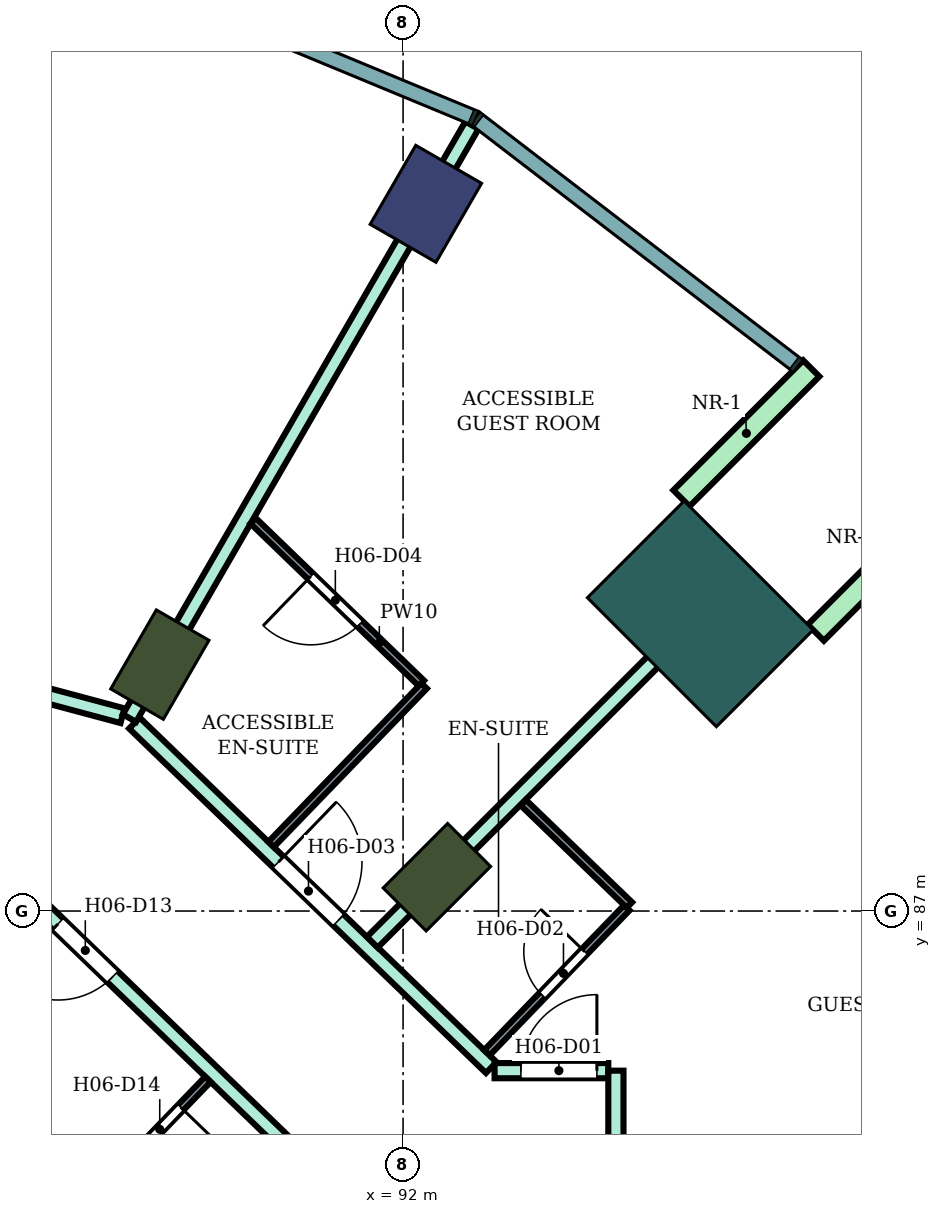
"""IFC4 building model, lengths in metres.
Left out: names, types, materials, properties, quantities, classifications, styles, units other than length and angle.
Written with IfcOpenShell. Run it as: python <this file> out.ifc"""

import sys

from ifc_helpers import new_model, si_unit, direction, frame, frame_2d, origin, origin_2d, place, context, subcontext, project, spatial, rectangle, extrude, element, fill, save


model = new_model("IFC4")
c1 = context("Model", 3, precision=1e-05, world=origin(), true_north=direction((0.0, 1.0)))
c2 = subcontext(c1, "Body", "Model", "MODEL_VIEW")
j1 = project(units=[si_unit("LENGTHUNIT", "METRE"), si_unit("PLANEANGLEUNIT", "RADIAN")], contexts=[c1])
p1 = place(None, origin())
s1 = spatial("IfcSite", under=j1, at=p1, CompositionType="ELEMENT")
p2 = place(p1, origin())
s2 = spatial("IfcBuilding", under=s1, at=p2, CompositionType="ELEMENT")
p3 = place(p2, frame((0.0, 0.0, 97.6)))
s3 = spatial("IfcBuildingStorey", under=s2, at=p3, CompositionType="ELEMENT", Elevation=97.6)
p4 = place(p3, frame((92.3, 96.304, 0.0), z_axis=(0.0, 0.0, 1.0), x_axis=(0.5, 0.866025403784, 0.0)))
e1 = element("IfcColumn", 1, at=p4, inside=s3, PredefinedType="COLUMN", context=c2, shape_type="SweptSolid", body=[
    extrude(rectangle(XDim=1.2, YDim=1.0, at=origin_2d()), origin(), (0.0, 0.0, 1.0), 3.8),
])
for number, where, z_axis, x_axis in (
    (2, (92.445, 87.445, 0.0), (0.0, 0.0, 1.0), (0.707, 0.707, 0.0)),
    (3, (88.8, 90.242, 0.0), (0.0, 0.0, 1.0), (0.5, 0.866, 0.0)),
):
    element("IfcColumn", number, at=place(p3, frame(where, z_axis=z_axis, x_axis=x_axis)), inside=s3, PredefinedType="COLUMN", context=c2, shape_type="SweptSolid", body=[
        extrude(rectangle(XDim=1.2, YDim=0.8, at=origin_2d()), origin(), (0.0, 0.0, 1.0), 3.8),
    ])
p5 = place(p3, frame((95.91, 90.91, 0.0), z_axis=(0.0, 0.0, 1.0), x_axis=(0.707106781187, 0.707106781187, 0.0)))
e4 = element("IfcColumn", 4, at=p5, inside=s3, PredefinedType="COLUMN", context=c2, shape_type="SweptSolid", body=[
    extrude(rectangle(XDim=1.8, YDim=2.4, at=origin_2d()), origin(), (0.0, 0.0, 1.0), 3.8),
])
for number, where, z_axis, x_axis in (
    (5, (97.43, 90.662, 0.0), (0.0, 0.0, 1.0), (0.707, 0.707, 0.0)),
    (6, (95.662, 92.43, 0.0), (0.0, 0.0, 1.0), (0.707, 0.707, 0.0)),
):
    element("IfcWall", number, at=place(p3, frame(where, z_axis=z_axis, x_axis=x_axis)), inside=s3, PredefinedType="NOTDEFINED", context=c2, shape_type="SweptSolid", body=[
        extrude(rectangle(XDim=2.416, YDim=0.3, at=frame_2d((1.208, 0.0))), origin(), (0.0, 0.0, 1.0), 3.8),
    ])
p6 = place(p3, frame((80.0, 91.796, 0.0), z_axis=(0.0, 0.0, 1.0), x_axis=(0.965917643923, -0.258849580177, 0.0)))
e7 = element("IfcWall", 7, at=p6, inside=s3, PredefinedType="PARTITIONING", context=c2, shape_type="SweptSolid", body=[
    extrude(rectangle(XDim=8.602, YDim=0.2, at=frame_2d((4.301, 0.0))), origin(), (0.0, 0.0, 1.0), 3.35),
])
p7 = place(p6, frame((2.091, 0.0, 0.0)))
e8 = element("IfcOpeningElement", 8, at=p7, cuts=e7, PredefinedType="OPENING", context=c2, shape_type="SweptSolid", body=[
    extrude(rectangle(XDim=1.8, YDim=2.1, at=frame_2d((0.9, 1.05))), frame((0.0, 0.11, 0.0), z_axis=(0.0, -1.0, 0.0), x_axis=(1.0, 0.0, 0.0)), (0.0, 0.0, 1.0), 0.22),
])
p8 = place(p3, frame((87.064, 87.211, 0.0), z_axis=(0.0, 0.0, 1.0), x_axis=(0.719540958932, -0.694450004262, 0.0)))
e9 = element("IfcWall", 9, at=p8, inside=s3, PredefinedType="PARTITIONING", context=c2, shape_type="SweptSolid", body=[
    extrude(rectangle(XDim=5.488, YDim=0.2, at=frame_2d((2.744, 0.0))), origin(), (0.0, 0.0, 1.0), 3.35),
])
p9 = place(p8, frame((0.55, 0.0, 0.0)))
e10 = element("IfcOpeningElement", 10, at=p9, cuts=e9, PredefinedType="OPENING", context=c2, shape_type="SweptSolid", body=[
    extrude(rectangle(XDim=1.0, YDim=2.1, at=frame_2d((0.5, 1.05))), frame((0.0, 0.11, 0.0), z_axis=(0.0, -1.0, 0.0), x_axis=(1.0, 0.0, 0.0)), (0.0, 0.0, 1.0), 0.22),
])
p10 = place(p3, frame((88.465, 89.473, 0.0), z_axis=(0.0, 0.0, 1.0), x_axis=(0.719474304909, -0.694519059908, 0.0)))
e11 = element("IfcWall", 11, at=p10, inside=s3, PredefinedType="PARTITIONING", context=c2, shape_type="SweptSolid", body=[
    extrude(rectangle(XDim=6.525, YDim=0.2, at=frame_2d((3.263, 0.0))), origin(), (0.0, 0.0, 1.0), 3.35),
])
p11 = place(p10, frame((2.633, 0.0, 0.0)))
e12 = element("IfcOpeningElement", 12, at=p11, cuts=e11, PredefinedType="OPENING", context=c2, shape_type="SweptSolid", body=[
    extrude(rectangle(XDim=1.1, YDim=2.1, at=frame_2d((0.55, 1.05))), frame((0.0, 0.11, 0.0), z_axis=(0.0, -1.0, 0.0), x_axis=(1.0, 0.0, 0.0)), (0.0, 0.0, 1.0), 0.22),
])
p12 = place(p3, frame((88.4, 89.538, 0.0), z_axis=(0.0, 0.0, 1.0), x_axis=(0.500234695877, 0.865889859648, 0.0)))
e13 = element("IfcWall", 13, at=p12, inside=s3, PredefinedType="PARTITIONING", context=c2, shape_type="SweptSolid", body=[
    extrude(rectangle(XDim=9.007, YDim=0.2, at=frame_2d((4.503, 0.0))), origin(), (0.0, 0.0, 1.0), 3.35),
])
p13 = place(p3, frame((91.595, 86.59, 0.0), z_axis=(0.0, 0.0, 1.0), x_axis=(0.707232337591, 0.706981202484, 0.0)))
e14 = element("IfcWall", 14, at=p13, inside=s3, PredefinedType="PARTITIONING", context=c2, shape_type="SweptSolid", body=[
    extrude(rectangle(XDim=6.805, YDim=0.2, at=frame_2d((3.402, 0.0))), origin(), (0.0, 0.0, 1.0), 3.35),
])
p14 = place(p3, frame((93.204, 84.9, 0.0), z_axis=(0.0, 0.0, 1.0), x_axis=(1.0, 0.0, 0.0)))
e15 = element("IfcWall", 15, at=p14, inside=s3, PredefinedType="PARTITIONING", context=c2, shape_type="SweptSolid", body=[
    extrude(rectangle(XDim=1.496, YDim=0.2, at=frame_2d((0.748, 0.0))), origin(), (0.0, 0.0, 1.0), 3.35),
])
p15 = place(p14, frame((0.346, 0.0, 0.0)))
e16 = element("IfcOpeningElement", 16, at=p15, cuts=e15, PredefinedType="OPENING", context=c2, shape_type="SweptSolid", body=[
    extrude(rectangle(XDim=1.0, YDim=2.1, at=frame_2d((0.5, 1.05))), frame((0.0, 0.11, 0.0), z_axis=(0.0, -1.0, 0.0), x_axis=(1.0, 0.0, 0.0)), (0.0, 0.0, 1.0), 0.22),
])
p16 = place(p3, frame((94.8, 83.401, 0.0), z_axis=(0.0, 0.0, 1.0), x_axis=(0.0, 1.0, 0.0)))
e17 = element("IfcWall", 17, at=p16, inside=s3, PredefinedType="PARTITIONING", context=c2, shape_type="SweptSolid", body=[
    extrude(rectangle(XDim=1.499, YDim=0.2, at=frame_2d((0.75, 0.0))), origin(), (0.0, 0.0, 1.0), 3.35),
])
p17 = place(p3, frame((88.095, 83.4, 0.0), z_axis=(0.0, 0.0, 1.0), x_axis=(0.694447472534, 0.719543402368, 0.0)))
e18 = element("IfcWall", 18, at=p17, inside=s3, PredefinedType="PARTITIONING", context=c2, shape_type="SweptSolid", body=[
    extrude(rectangle(XDim=1.926, YDim=0.1, at=frame_2d((0.963, 0.0))), origin(), (0.0, 0.0, 1.0), 3.35),
])
p18 = place(p17, frame((0.613, 0.0, 0.0)))
e19 = element("IfcOpeningElement", 19, at=p18, cuts=e18, PredefinedType="OPENING", context=c2, shape_type="SweptSolid", body=[
    extrude(rectangle(XDim=0.8, YDim=2.1, at=frame_2d((0.4, 1.05))), frame((0.0, 0.06, 0.0), z_axis=(0.0, -1.0, 0.0), x_axis=(1.0, 0.0, 0.0)), (0.0, 0.0, 1.0), 0.12),
])
p19 = place(p3, frame((90.027, 92.134, 0.0), z_axis=(0.0, 0.0, 1.0), x_axis=(0.719415132118, -0.694580353652, 0.0)))
e20 = element("IfcWall", 20, at=p19, inside=s3, PredefinedType="PARTITIONING", context=c2, shape_type="SweptSolid", body=[
    extrude(rectangle(XDim=3.077, YDim=0.1, at=frame_2d((1.539, 0.0))), origin(), (0.0, 0.0, 1.0), 3.35),
])
p20 = place(p19, frame((1.053, 0.0, 0.0)))
e21 = element("IfcOpeningElement", 21, at=p20, cuts=e20, PredefinedType="OPENING", context=c2, shape_type="SweptSolid", body=[
    extrude(rectangle(XDim=0.9, YDim=2.1, at=frame_2d((0.45, 1.05))), frame((0.0, 0.06, 0.0), z_axis=(0.0, -1.0, 0.0), x_axis=(1.0, 0.0, 0.0)), (0.0, 0.0, 1.0), 0.12),
])
p21 = place(p3, frame((90.263, 87.876, 0.0), z_axis=(0.0, 0.0, 1.0), x_axis=(0.694534400859, 0.719459495749, 0.0)))
e22 = element("IfcWall", 22, at=p21, inside=s3, PredefinedType="PARTITIONING", context=c2, shape_type="SweptSolid", body=[
    extrude(rectangle(XDim=2.899, YDim=0.1, at=frame_2d((1.45, 0.0))), origin(), (0.0, 0.0, 1.0), 3.35),
])
p22 = place(p3, frame((93.104, 85.136, 0.0), z_axis=(0.0, 0.0, 1.0), x_axis=(0.694324808789, 0.719661767708, 0.0)))
e23 = element("IfcWall", 23, at=p22, inside=s3, PredefinedType="PARTITIONING", context=c2, shape_type="SweptSolid", body=[
    extrude(rectangle(XDim=2.65, YDim=0.1, at=frame_2d((1.325, 0.0))), origin(), (0.0, 0.0, 1.0), 3.35),
])
p23 = place(p22, frame((1.05, 0.0, 0.0)))
e24 = element("IfcOpeningElement", 24, at=p23, cuts=e23, PredefinedType="OPENING", context=c2, shape_type="SweptSolid", body=[
    extrude(rectangle(XDim=0.8, YDim=2.1, at=frame_2d((0.4, 1.05))), frame((0.0, 0.06, 0.0), z_axis=(0.0, -1.0, 0.0), x_axis=(1.0, 0.0, 0.0)), (0.0, 0.0, 1.0), 0.12),
])
p24 = place(p3, frame((93.582, 88.426, 0.0), z_axis=(0.0, 0.0, 1.0), x_axis=(0.719707242969, -0.694277670977, 0.0)))
e25 = element("IfcWall", 25, at=p24, inside=s3, PredefinedType="PARTITIONING", context=c2, shape_type="SweptSolid", body=[
    extrude(rectangle(XDim=1.939, YDim=0.1, at=frame_2d((0.97, 0.0))), origin(), (0.0, 0.0, 1.0), 3.35),
])
p25 = place(p15, origin())
e26 = element("IfcDoor", 26, at=p25, inside=s3, OperationType="SINGLE_SWING_RIGHT", PredefinedType="DOOR", context=c2, shape_type="SweptSolid", body=[
    extrude(rectangle(XDim=1.0, YDim=2.1, at=frame_2d((0.5, 1.05))), frame((0.0, 0.025, 0.0), z_axis=(0.0, -1.0, 0.0), x_axis=(1.0, 0.0, 0.0)), (0.0, 0.0, 1.0), 0.05),
])
fill(e16, e26)
p26 = place(p23, origin())
e27 = element("IfcDoor", 27, at=p26, inside=s3, OperationType="SINGLE_SWING_RIGHT", PredefinedType="DOOR", context=c2, shape_type="SweptSolid", body=[
    extrude(rectangle(XDim=0.8, YDim=2.1, at=frame_2d((0.4, 1.05))), frame((0.0, 0.025, 0.0), z_axis=(0.0, -1.0, 0.0), x_axis=(1.0, 0.0, 0.0)), (0.0, 0.0, 1.0), 0.05),
])
fill(e24, e27)
p27 = place(p11, origin())
e28 = element("IfcDoor", 28, at=p27, inside=s3, OperationType="SINGLE_SWING_LEFT", PredefinedType="DOOR", context=c2, shape_type="SweptSolid", body=[
    extrude(rectangle(XDim=1.1, YDim=2.1, at=frame_2d((0.55, 1.05))), frame((0.0, 0.025, 0.0), z_axis=(0.0, -1.0, 0.0), x_axis=(1.0, 0.0, 0.0)), (0.0, 0.0, 1.0), 0.05),
])
fill(e12, e28)
p28 = place(p20, frame((0.9, 0.0, 0.0), z_axis=(0.0, 0.0, 1.0), x_axis=(-1.0, 0.0, 0.0)))
e29 = element("IfcDoor", 29, at=p28, inside=s3, OperationType="SINGLE_SWING_RIGHT", PredefinedType="DOOR", context=c2, shape_type="SweptSolid", body=[
    extrude(rectangle(XDim=0.9, YDim=2.1, at=frame_2d((0.45, 1.05))), frame((0.0, 0.025, 0.0), z_axis=(0.0, -1.0, 0.0), x_axis=(1.0, 0.0, 0.0)), (0.0, 0.0, 1.0), 0.05),
])
fill(e21, e29)
p29 = place(p9, frame((1.0, 0.0, 0.0), z_axis=(0.0, 0.0, 1.0), x_axis=(-1.0, 0.0, 0.0)))
e30 = element("IfcDoor", 30, at=p29, inside=s3, OperationType="SINGLE_SWING_RIGHT", PredefinedType="DOOR", context=c2, shape_type="SweptSolid", body=[
    extrude(rectangle(XDim=1.0, YDim=2.1, at=frame_2d((0.5, 1.05))), frame((0.0, 0.025, 0.0), z_axis=(0.0, -1.0, 0.0), x_axis=(1.0, 0.0, 0.0)), (0.0, 0.0, 1.0), 0.05),
])
fill(e10, e30)
p30 = place(p18, frame((0.8, 0.0, 0.0), z_axis=(0.0, 0.0, 1.0), x_axis=(-1.0, 0.0, 0.0)))
e31 = element("IfcDoor", 31, at=p30, inside=s3, OperationType="SINGLE_SWING_LEFT", PredefinedType="DOOR", context=c2, shape_type="SweptSolid", body=[
    extrude(rectangle(XDim=0.8, YDim=2.1, at=frame_2d((0.4, 1.05))), frame((0.0, 0.025, 0.0), z_axis=(0.0, -1.0, 0.0), x_axis=(1.0, 0.0, 0.0)), (0.0, 0.0, 1.0), 0.05),
])
fill(e19, e31)
save(model, sys.argv[1])
